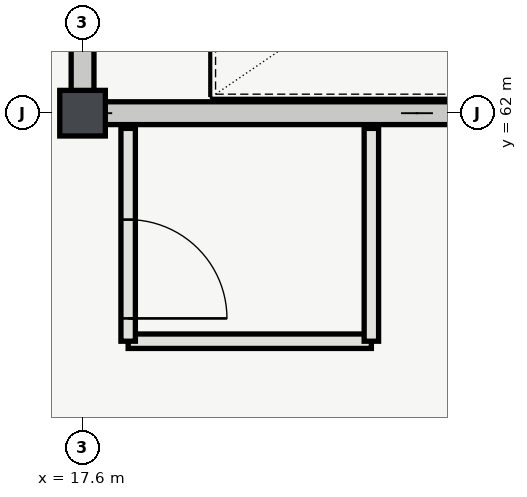
"""IFC4 building model, lengths in metres.
Left out: names, types, materials, properties, quantities, classifications, styles, units other than length and angle.
Written with IfcOpenShell. Run it as: python <this file> out.ifc"""

import sys

from ifc_helpers import new_model, si_unit, direction, frame, frame_2d, origin, origin_2d, place, context, subcontext, project, spatial, rectangle, extrude, element, fill, save


model = new_model("IFC4")
c1 = context("Model", 3, precision=1e-05, world=origin(), true_north=direction((0.0, 1.0)))
c2 = subcontext(c1, "Body", "Model", "MODEL_VIEW")
j1 = project(units=[si_unit("LENGTHUNIT", "METRE"), si_unit("PLANEANGLEUNIT", "RADIAN")], contexts=[c1])
p1 = place(None, origin())
s1 = spatial("IfcSite", under=j1, at=p1, CompositionType="ELEMENT")
p2 = place(p1, origin())
s2 = spatial("IfcBuilding", under=s1, at=p2, CompositionType="ELEMENT")
p3 = place(p2, frame((0.0, 0.0, 41.4)))
s3 = spatial("IfcBuildingStorey", under=s2, at=p3, CompositionType="ELEMENT", Elevation=41.4)
p4 = place(p3, frame((17.6, 62.0, 0.0), z_axis=(0.0, 0.0, 1.0), x_axis=(1.0, 0.0, 0.0)))
e1 = element("IfcColumn", 1, at=p4, inside=s3, PredefinedType="COLUMN", context=c2, shape_type="SweptSolid", body=[
    extrude(rectangle(XDim=0.6, YDim=0.6, at=origin_2d()), origin(), (0.0, 0.0, 1.0), 4.2),
])
p5 = place(p3, frame((17.45, 62.0, 0.0), z_axis=(0.0, 0.0, 1.0), x_axis=(1.0, 0.0, 0.0)))
e2 = element("IfcWall", 2, at=p5, inside=s3, PredefinedType="SHEAR", context=c2, shape_type="SweptSolid", body=[
    extrude(rectangle(XDim=9.1, YDim=0.3, at=frame_2d((4.55, 0.0))), origin(), (0.0, 0.0, 1.0), 3.92),
])
p6 = place(p3, frame((17.6, 62.15, 0.0), z_axis=(0.0, 0.0, 1.0), x_axis=(0.0, 1.0, 0.0)))
e3 = element("IfcWall", 3, at=p6, inside=s3, PredefinedType="SHEAR", context=c2, shape_type="SweptSolid", body=[
    extrude(rectangle(XDim=7.7, YDim=0.3, at=frame_2d((3.85, 0.0))), origin(), (0.0, 0.0, 1.0), 3.92),
])
p7 = place(p6, frame((1.675, 0.0, 0.0)))
e4 = element("IfcOpeningElement", 4, at=p7, cuts=e3, PredefinedType="OPENING", context=c2, shape_type="SweptSolid", body=[
    extrude(rectangle(XDim=1.35, YDim=2.2, at=frame_2d((0.675, 1.1))), frame((0.0, 0.16, 0.0), z_axis=(0.0, -1.0, 0.0), x_axis=(1.0, 0.0, 0.0)), (0.0, 0.0, 1.0), 0.32),
])
p8 = place(p6, frame((5.7, 0.0, 0.0)))
e5 = element("IfcOpeningElement", 5, at=p8, cuts=e3, PredefinedType="OPENING", context=c2, shape_type="SweptSolid", body=[
    extrude(rectangle(XDim=1.0, YDim=2.15, at=frame_2d((0.5, 1.075))), frame((0.0, 0.16, 0.0), z_axis=(0.0, -1.0, 0.0), x_axis=(1.0, 0.0, 0.0)), (0.0, 0.0, 1.0), 0.32),
])
p9 = place(p3, frame((18.2, 59.0, 0.0), z_axis=(0.0, 0.0, 1.0), x_axis=(1.0, 0.0, 0.0)))
e6 = element("IfcWall", 6, at=p9, inside=s3, PredefinedType="PARTITIONING", context=c2, shape_type="SweptSolid", body=[
    extrude(rectangle(XDim=3.2, YDim=0.19, at=frame_2d((1.6, 0.0))), origin(), (0.0, 0.0, 1.0), 3.92),
])
p10 = place(p3, frame((18.2, 61.8, 0.0), z_axis=(0.0, 0.0, 1.0), x_axis=(0.0, -1.0, 0.0)))
e7 = element("IfcWall", 7, at=p10, inside=s3, PredefinedType="PARTITIONING", context=c2, shape_type="SweptSolid", body=[
    extrude(rectangle(XDim=2.8, YDim=0.19, at=frame_2d((1.4, 0.0))), origin(), (0.0, 0.0, 1.0), 3.92),
])
p11 = place(p10, frame((1.2, 0.0, 0.0)))
e8 = element("IfcOpeningElement", 8, at=p11, cuts=e7, PredefinedType="OPENING", context=c2, shape_type="SweptSolid", body=[
    extrude(rectangle(XDim=1.3, YDim=2.2, at=frame_2d((0.65, 1.1))), frame((0.0, 0.105, 0.0), z_axis=(0.0, -1.0, 0.0), x_axis=(1.0, 0.0, 0.0)), (0.0, 0.0, 1.0), 0.21),
])
p12 = place(p3, frame((21.4, 59.0, 0.0), z_axis=(0.0, 0.0, 1.0), x_axis=(0.0, 1.0, 0.0)))
e9 = element("IfcWall", 9, at=p12, inside=s3, PredefinedType="PARTITIONING", context=c2, shape_type="SweptSolid", body=[
    extrude(rectangle(XDim=2.8, YDim=0.19, at=frame_2d((1.4, 0.0))), origin(), (0.0, 0.0, 1.0), 3.92),
])
p13 = place(p11, origin())
e10 = element("IfcDoor", 10, at=p13, inside=s3, OperationType="SINGLE_SWING_RIGHT", PredefinedType="DOOR", context=c2, shape_type="SweptSolid", body=[
    extrude(rectangle(XDim=1.3, YDim=2.2, at=frame_2d((0.65, 1.1))), frame((0.0, 0.025, 0.0), z_axis=(0.0, -1.0, 0.0), x_axis=(1.0, 0.0, 0.0)), (0.0, 0.0, 1.0), 0.05),
])
fill(e8, e10)
save(model, sys.argv[1])
